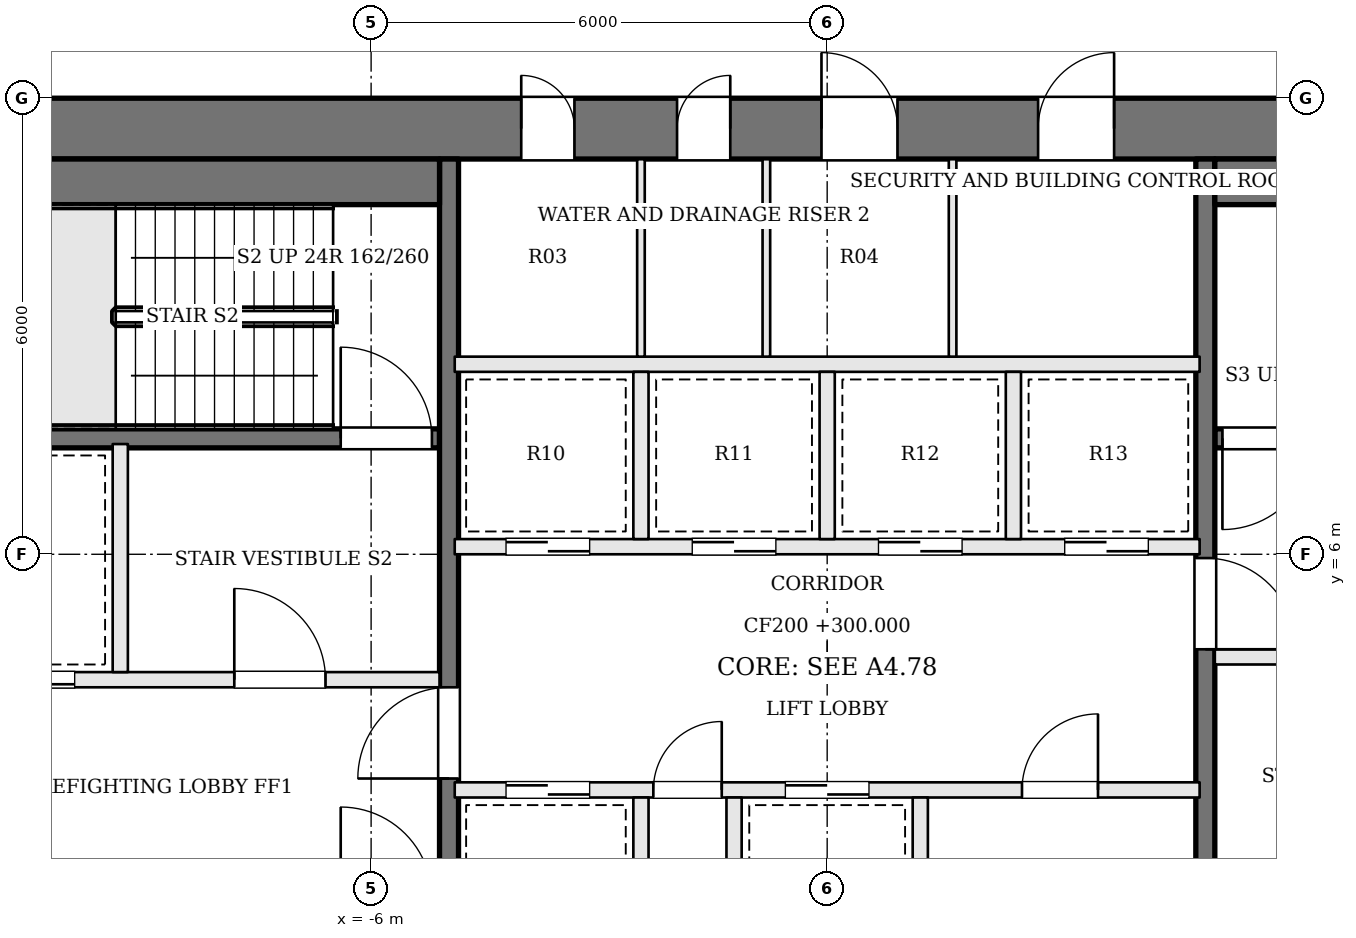
"""IFC4 building model, lengths in metres.
Left out: names, types, materials, properties, quantities, classifications, styles, units other than length and angle.
Written with IfcOpenShell. Run it as: python <this file> out.ifc"""

import sys

from ifc_helpers import new_model, si_unit, direction, frame, frame_2d, origin, place, context, subcontext, project, spatial, rectangle, extrude, element, fill, save


model = new_model("IFC4")
c1 = context("Model", 3, precision=1e-05, world=origin(), true_north=direction((0.0, 1.0)))
c2 = subcontext(c1, "Body", "Model", "MODEL_VIEW")
j1 = project(units=[si_unit("LENGTHUNIT", "METRE"), si_unit("PLANEANGLEUNIT", "RADIAN")], contexts=[c1])
p1 = place(None, origin())
s1 = spatial("IfcSite", under=j1, at=p1, CompositionType="ELEMENT")
p2 = place(p1, origin())
s2 = spatial("IfcBuilding", under=s1, at=p2, CompositionType="ELEMENT")
p3 = place(p2, frame((0.0, 0.0, 300.0)))
s3 = spatial("IfcBuildingStorey", under=s2, at=p3, CompositionType="ELEMENT", Elevation=300.0)
p4 = place(p3, frame((-13.0, 11.6, 0.0), z_axis=(0.0, 0.0, 1.0), x_axis=(1.0, 0.0, 0.0)))
e1 = element("IfcWall", 1, at=p4, inside=s3, PredefinedType="SHEAR", context=c2, shape_type="SweptSolid", body=[
    extrude(rectangle(XDim=26.0, YDim=0.8, at=frame_2d((13.0, 0.0))), origin(), (0.0, 0.0, 1.0), 3.9),
])
p5 = place(p4, frame((8.975, 0.0, 0.0)))
e2 = element("IfcOpeningElement", 2, at=p5, cuts=e1, PredefinedType="OPENING", context=c2, shape_type="SweptSolid", body=[
    extrude(rectangle(XDim=0.7, YDim=2.1, at=frame_2d((0.35, 1.05))), frame((0.0, 0.41, 0.0), z_axis=(0.0, -1.0, 0.0), x_axis=(1.0, 0.0, 0.0)), (0.0, 0.0, 1.0), 0.82),
])
p6 = place(p4, frame((11.025, 0.0, 0.0)))
e3 = element("IfcOpeningElement", 3, at=p6, cuts=e1, PredefinedType="OPENING", context=c2, shape_type="SweptSolid", body=[
    extrude(rectangle(XDim=0.7, YDim=2.1, at=frame_2d((0.35, 1.05))), frame((0.0, 0.41, 0.0), z_axis=(0.0, -1.0, 0.0), x_axis=(1.0, 0.0, 0.0)), (0.0, 0.0, 1.0), 0.82),
])
p7 = place(p4, frame((12.925, 0.0, 0.0)))
e4 = element("IfcOpeningElement", 4, at=p7, cuts=e1, PredefinedType="OPENING", context=c2, shape_type="SweptSolid", body=[
    extrude(rectangle(XDim=1.0, YDim=2.1, at=frame_2d((0.5, 1.05))), frame((0.0, 0.41, 0.0), z_axis=(0.0, -1.0, 0.0), x_axis=(1.0, 0.0, 0.0)), (0.0, 0.0, 1.0), 0.82),
])
p8 = place(p4, frame((15.775, 0.0, 0.0)))
e5 = element("IfcOpeningElement", 5, at=p8, cuts=e1, PredefinedType="OPENING", context=c2, shape_type="SweptSolid", body=[
    extrude(rectangle(XDim=1.0, YDim=2.1, at=frame_2d((0.5, 1.05))), frame((0.0, 0.41, 0.0), z_axis=(0.0, -1.0, 0.0), x_axis=(1.0, 0.0, 0.0)), (0.0, 0.0, 1.0), 0.82),
])
p9 = place(p3, frame((12.2, 7.525, 0.0), z_axis=(0.0, 0.0, 1.0), x_axis=(-1.0, 0.0, 0.0)))
e6 = element("IfcWall", 6, at=p9, inside=s3, PredefinedType="SOLIDWALL", context=c2, shape_type="SweptSolid", body=[
    extrude(rectangle(XDim=7.1, YDim=0.25, at=frame_2d((3.55, 0.0))), origin(), (0.0, 0.0, 1.0), 3.7),
])
p10 = place(p9, frame((5.8, 0.0, 0.0)))
e7 = element("IfcOpeningElement", 7, at=p10, cuts=e6, PredefinedType="OPENING", context=c2, shape_type="SweptSolid", body=[
    extrude(rectangle(XDim=1.2, YDim=2.1, at=frame_2d((0.6, 1.05))), frame((0.0, 0.135, 0.0), z_axis=(0.0, -1.0, 0.0), x_axis=(1.0, 0.0, 0.0)), (0.0, 0.0, 1.0), 0.27),
])
p11 = place(p3, frame((-12.2, 4.35, 0.0), z_axis=(0.0, 0.0, 1.0), x_axis=(1.0, 0.0, 0.0)))
e8 = element("IfcWall", 8, at=p11, inside=s3, PredefinedType="SOLIDWALL", context=c2, shape_type="SweptSolid", body=[
    extrude(rectangle(XDim=7.1, YDim=0.2, at=frame_2d((3.55, 0.0))), origin(), (0.0, 0.0, 1.0), 3.7),
])
p12 = place(p11, frame((4.4, 0.0, 0.0)))
e9 = element("IfcOpeningElement", 9, at=p12, cuts=e8, PredefinedType="OPENING", context=c2, shape_type="SweptSolid", body=[
    extrude(rectangle(XDim=1.2, YDim=2.1, at=frame_2d((0.6, 1.05))), frame((0.0, 0.11, 0.0), z_axis=(0.0, -1.0, 0.0), x_axis=(1.0, 0.0, 0.0)), (0.0, 0.0, 1.0), 0.22),
])
p13 = place(p11, frame((1.1, 0.0, 0.0)))
e10 = element("IfcOpeningElement", 10, at=p13, cuts=e8, PredefinedType="OPENING", context=c2, shape_type="SweptSolid", body=[
    extrude(rectangle(XDim=1.2, YDim=2.1, at=frame_2d((0.6, 1.05))), frame((0.0, 0.11, 0.0), z_axis=(0.0, -1.0, 0.0), x_axis=(1.0, 0.0, 0.0)), (0.0, 0.0, 1.0), 0.22),
])
p14 = place(p3, frame((12.2, 4.65, 0.0), z_axis=(0.0, 0.0, 1.0), x_axis=(-1.0, 0.0, 0.0)))
e11 = element("IfcWall", 11, at=p14, inside=s3, PredefinedType="SOLIDWALL", context=c2, shape_type="SweptSolid", body=[
    extrude(rectangle(XDim=7.1, YDim=0.2, at=frame_2d((3.55, 0.0))), origin(), (0.0, 0.0, 1.0), 3.7),
])
p15 = place(p14, frame((4.4, 0.0, 0.0)))
e12 = element("IfcOpeningElement", 12, at=p15, cuts=e11, PredefinedType="OPENING", context=c2, shape_type="SweptSolid", body=[
    extrude(rectangle(XDim=1.2, YDim=2.1, at=frame_2d((0.6, 1.05))), frame((0.0, 0.11, 0.0), z_axis=(0.0, -1.0, 0.0), x_axis=(1.0, 0.0, 0.0)), (0.0, 0.0, 1.0), 0.22),
])
p16 = place(p14, frame((1.1, 0.0, 0.0)))
e13 = element("IfcOpeningElement", 13, at=p16, cuts=e11, PredefinedType="OPENING", context=c2, shape_type="SweptSolid", body=[
    extrude(rectangle(XDim=1.2, YDim=2.1, at=frame_2d((0.6, 1.05))), frame((0.0, 0.11, 0.0), z_axis=(0.0, -1.0, 0.0), x_axis=(1.0, 0.0, 0.0)), (0.0, 0.0, 1.0), 0.22),
])
p17 = place(p3, frame((-12.2, 7.525, 0.0), z_axis=(0.0, 0.0, 1.0), x_axis=(1.0, 0.0, 0.0)))
e14 = element("IfcWall", 14, at=p17, inside=s3, PredefinedType="SOLIDWALL", context=c2, shape_type="SweptSolid", body=[
    extrude(rectangle(XDim=7.1, YDim=0.25, at=frame_2d((3.55, 0.0))), origin(), (0.0, 0.0, 1.0), 3.7),
])
p18 = place(p17, frame((5.8, 0.0, 0.0)))
e15 = element("IfcOpeningElement", 15, at=p18, cuts=e14, PredefinedType="OPENING", context=c2, shape_type="SweptSolid", body=[
    extrude(rectangle(XDim=1.2, YDim=2.1, at=frame_2d((0.6, 1.05))), frame((0.0, 0.135, 0.0), z_axis=(0.0, -1.0, 0.0), x_axis=(1.0, 0.0, 0.0)), (0.0, 0.0, 1.0), 0.27),
])
p19 = place(p3, frame((-9.3, 4.45, 0.0), z_axis=(0.0, 0.0, 1.0), x_axis=(0.0, 1.0, 0.0)))
e16 = element("IfcWall", 16, at=p19, inside=s3, PredefinedType="SOLIDWALL", context=c2, shape_type="SweptSolid", body=[
    extrude(rectangle(XDim=3.0, YDim=0.2, at=frame_2d((1.5, 0.0))), origin(), (0.0, 0.0, 1.0), 3.7),
])
p20 = place(p3, frame((-4.975, -2.2, 0.0), z_axis=(0.0, 0.0, 1.0), x_axis=(0.0, 1.0, 0.0)))
e17 = element("IfcWall", 17, at=p20, inside=s3, PredefinedType="SOLIDWALL", context=c2, shape_type="SweptSolid", body=[
    extrude(rectangle(XDim=13.4, YDim=0.25, at=frame_2d((6.7, 0.0))), origin(), (0.0, 0.0, 1.0), 3.7),
])
p21 = place(p20, frame((5.25, 0.0, 0.0)))
e18 = element("IfcOpeningElement", 18, at=p21, cuts=e17, PredefinedType="OPENING", context=c2, shape_type="SweptSolid", body=[
    extrude(rectangle(XDim=1.2, YDim=2.1, at=frame_2d((0.6, 1.05))), frame((0.0, 0.135, 0.0), z_axis=(0.0, -1.0, 0.0), x_axis=(1.0, 0.0, 0.0)), (0.0, 0.0, 1.0), 0.27),
])
p22 = place(p3, frame((4.975, 11.2, 0.0), z_axis=(0.0, 0.0, 1.0), x_axis=(0.0, -1.0, 0.0)))
e19 = element("IfcWall", 19, at=p22, inside=s3, PredefinedType="SOLIDWALL", context=c2, shape_type="SweptSolid", body=[
    extrude(rectangle(XDim=13.4, YDim=0.25, at=frame_2d((6.7, 0.0))), origin(), (0.0, 0.0, 1.0), 3.7),
])
p23 = place(p22, frame((5.25, 0.0, 0.0)))
e20 = element("IfcOpeningElement", 20, at=p23, cuts=e19, PredefinedType="OPENING", context=c2, shape_type="SweptSolid", body=[
    extrude(rectangle(XDim=1.2, YDim=2.1, at=frame_2d((0.6, 1.05))), frame((0.0, 0.135, 0.0), z_axis=(0.0, -1.0, 0.0), x_axis=(1.0, 0.0, 0.0)), (0.0, 0.0, 1.0), 0.27),
])
for number, where, z_axis, x_axis in (
    (21, (-12.2, 10.9, 0.0), (0.0, 0.0, 1.0), (1.0, 0.0, 0.0)),
    (22, (12.2, 10.9, 0.0), (0.0, 0.0, 1.0), (-1.0, 0.0, 0.0)),
):
    element("IfcWall", number, at=place(p3, frame(where, z_axis=z_axis, x_axis=x_axis)), inside=s3, PredefinedType="SOLIDWALL", context=c2, shape_type="SweptSolid", body=[
        extrude(rectangle(XDim=7.1, YDim=0.6, at=frame_2d((3.55, 0.0))), origin(), (0.0, 0.0, 1.0), 3.7),
    ])
p24 = place(p3, frame((-4.9, 2.9, 0.0), z_axis=(0.0, 0.0, 1.0), x_axis=(1.0, 0.0, 0.0)))
e23 = element("IfcWall", 23, at=p24, inside=s3, PredefinedType="SOLIDWALL", context=c2, shape_type="SweptSolid", body=[
    extrude(rectangle(XDim=9.8, YDim=0.2, at=frame_2d((4.9, 0.0))), origin(), (0.0, 0.0, 1.0), 3.7),
])
p25 = place(p24, frame((0.675, 0.0, 0.0)))
e24 = element("IfcOpeningElement", 24, at=p25, cuts=e23, PredefinedType="OPENING", context=c2, shape_type="SweptSolid", body=[
    extrude(rectangle(XDim=1.1, YDim=2.1, at=frame_2d((0.55, 1.05))), frame((0.0, 0.11, 0.0), z_axis=(0.0, -1.0, 0.0), x_axis=(1.0, 0.0, 0.0)), (0.0, 0.0, 1.0), 0.22),
])
p26 = place(p24, frame((2.613, 0.0, 0.0)))
e25 = element("IfcOpeningElement", 25, at=p26, cuts=e23, PredefinedType="OPENING", context=c2, shape_type="SweptSolid", body=[
    extrude(rectangle(XDim=0.9, YDim=2.1, at=frame_2d((0.45, 1.05))), frame((0.0, 0.11, 0.0), z_axis=(0.0, -1.0, 0.0), x_axis=(1.0, 0.0, 0.0)), (0.0, 0.0, 1.0), 0.22),
])
p27 = place(p24, frame((4.35, 0.0, 0.0)))
e26 = element("IfcOpeningElement", 26, at=p27, cuts=e23, PredefinedType="OPENING", context=c2, shape_type="SweptSolid", body=[
    extrude(rectangle(XDim=1.1, YDim=2.1, at=frame_2d((0.55, 1.05))), frame((0.0, 0.11, 0.0), z_axis=(0.0, -1.0, 0.0), x_axis=(1.0, 0.0, 0.0)), (0.0, 0.0, 1.0), 0.22),
])
p28 = place(p24, frame((7.463, 0.0, 0.0)))
e27 = element("IfcOpeningElement", 27, at=p28, cuts=e23, PredefinedType="OPENING", context=c2, shape_type="SweptSolid", body=[
    extrude(rectangle(XDim=1.0, YDim=2.1, at=frame_2d((0.5, 1.05))), frame((0.0, 0.11, 0.0), z_axis=(0.0, -1.0, 0.0), x_axis=(1.0, 0.0, 0.0)), (0.0, 0.0, 1.0), 0.22),
])
p29 = place(p3, frame((-4.9, 6.1, 0.0), z_axis=(0.0, 0.0, 1.0), x_axis=(1.0, 0.0, 0.0)))
e28 = element("IfcWall", 28, at=p29, inside=s3, PredefinedType="SOLIDWALL", context=c2, shape_type="SweptSolid", body=[
    extrude(rectangle(XDim=9.8, YDim=0.2, at=frame_2d((4.9, 0.0))), origin(), (0.0, 0.0, 1.0), 3.7),
])
p30 = place(p29, frame((0.675, 0.0, 0.0)))
e29 = element("IfcOpeningElement", 29, at=p30, cuts=e28, PredefinedType="OPENING", context=c2, shape_type="SweptSolid", body=[
    extrude(rectangle(XDim=1.1, YDim=2.1, at=frame_2d((0.55, 1.05))), frame((0.0, 0.11, 0.0), z_axis=(0.0, -1.0, 0.0), x_axis=(1.0, 0.0, 0.0)), (0.0, 0.0, 1.0), 0.22),
])
p31 = place(p29, frame((3.125, 0.0, 0.0)))
e30 = element("IfcOpeningElement", 30, at=p31, cuts=e28, PredefinedType="OPENING", context=c2, shape_type="SweptSolid", body=[
    extrude(rectangle(XDim=1.1, YDim=2.1, at=frame_2d((0.55, 1.05))), frame((0.0, 0.11, 0.0), z_axis=(0.0, -1.0, 0.0), x_axis=(1.0, 0.0, 0.0)), (0.0, 0.0, 1.0), 0.22),
])
p32 = place(p29, frame((5.575, 0.0, 0.0)))
e31 = element("IfcOpeningElement", 31, at=p32, cuts=e28, PredefinedType="OPENING", context=c2, shape_type="SweptSolid", body=[
    extrude(rectangle(XDim=1.1, YDim=2.1, at=frame_2d((0.55, 1.05))), frame((0.0, 0.11, 0.0), z_axis=(0.0, -1.0, 0.0), x_axis=(1.0, 0.0, 0.0)), (0.0, 0.0, 1.0), 0.22),
])
p33 = place(p29, frame((8.025, 0.0, 0.0)))
e32 = element("IfcOpeningElement", 32, at=p33, cuts=e28, PredefinedType="OPENING", context=c2, shape_type="SweptSolid", body=[
    extrude(rectangle(XDim=1.1, YDim=2.1, at=frame_2d((0.55, 1.05))), frame((0.0, 0.11, 0.0), z_axis=(0.0, -1.0, 0.0), x_axis=(1.0, 0.0, 0.0)), (0.0, 0.0, 1.0), 0.22),
])
p34 = place(p3, frame((-4.9, 8.5, 0.0), z_axis=(0.0, 0.0, 1.0), x_axis=(1.0, 0.0, 0.0)))
e33 = element("IfcWall", 33, at=p34, inside=s3, PredefinedType="SOLIDWALL", context=c2, shape_type="SweptSolid", body=[
    extrude(rectangle(XDim=9.8, YDim=0.2, at=frame_2d((4.9, 0.0))), origin(), (0.0, 0.0, 1.0), 3.7),
])
for number, where, z_axis, x_axis in (
    (34, (-2.45, 0.6, 0.0), (0.0, 0.0, 1.0), (0.0, 1.0, 0.0)),
    (35, (-1.225, 0.6, 0.0), (0.0, 0.0, 1.0), (0.0, 1.0, 0.0)),
    (36, (1.225, 0.6, 0.0), (0.0, 0.0, 1.0), (0.0, 1.0, 0.0)),
    (37, (-2.45, 6.2, 0.0), (0.0, 0.0, 1.0), (0.0, 1.0, 0.0)),
    (38, (0.0, 6.2, 0.0), (0.0, 0.0, 1.0), (0.0, 1.0, 0.0)),
    (39, (2.45, 6.2, 0.0), (0.0, 0.0, 1.0), (0.0, 1.0, 0.0)),
):
    element("IfcWall", number, at=place(p3, frame(where, z_axis=z_axis, x_axis=x_axis)), inside=s3, PredefinedType="SOLIDWALL", context=c2, shape_type="SweptSolid", body=[
        extrude(rectangle(XDim=2.2, YDim=0.2, at=frame_2d((1.1, 0.0))), origin(), (0.0, 0.0, 1.0), 3.7),
    ])
for number, where, z_axis, x_axis in (
    (40, (-2.45, 8.6, 0.0), (0.0, 0.0, 1.0), (0.0, 1.0, 0.0)),
    (41, (-0.8, 8.6, 0.0), (0.0, 0.0, 1.0), (0.0, 1.0, 0.0)),
    (42, (1.65, 8.6, 0.0), (0.0, 0.0, 1.0), (0.0, 1.0, 0.0)),
):
    element("IfcWall", number, at=place(p3, frame(where, z_axis=z_axis, x_axis=x_axis)), inside=s3, PredefinedType="PARTITIONING", context=c2, shape_type="SweptSolid", body=[
        extrude(rectangle(XDim=2.6, YDim=0.1, at=frame_2d((1.3, 0.0))), origin(), (0.0, 0.0, 1.0), 3.7),
    ])
p35 = place(p21, origin())
e43 = element("IfcDoor", 43, at=p35, inside=s3, OperationType="SINGLE_SWING_LEFT", PredefinedType="DOOR", context=c2, shape_type="SweptSolid", body=[
    extrude(rectangle(XDim=1.2, YDim=2.1, at=frame_2d((0.6, 1.05))), frame((0.0, 0.025, 0.0), z_axis=(0.0, -1.0, 0.0), x_axis=(1.0, 0.0, 0.0)), (0.0, 0.0, 1.0), 0.05),
])
fill(e18, e43)
p36 = place(p23, origin())
e44 = element("IfcDoor", 44, at=p36, inside=s3, OperationType="SINGLE_SWING_RIGHT", PredefinedType="DOOR", context=c2, shape_type="SweptSolid", body=[
    extrude(rectangle(XDim=1.2, YDim=2.1, at=frame_2d((0.6, 1.05))), frame((0.0, 0.025, 0.0), z_axis=(0.0, -1.0, 0.0), x_axis=(1.0, 0.0, 0.0)), (0.0, 0.0, 1.0), 0.05),
])
fill(e20, e44)
p37 = place(p12, origin())
e45 = element("IfcDoor", 45, at=p37, inside=s3, OperationType="SINGLE_SWING_LEFT", PredefinedType="DOOR", context=c2, shape_type="SweptSolid", body=[
    extrude(rectangle(XDim=1.2, YDim=2.1, at=frame_2d((0.6, 1.05))), frame((0.0, 0.025, 0.0), z_axis=(0.0, -1.0, 0.0), x_axis=(1.0, 0.0, 0.0)), (0.0, 0.0, 1.0), 0.05),
])
fill(e9, e45)
p38 = place(p10, origin())
e46 = element("IfcDoor", 46, at=p38, inside=s3, OperationType="SINGLE_SWING_RIGHT", PredefinedType="DOOR", context=c2, shape_type="SweptSolid", body=[
    extrude(rectangle(XDim=1.2, YDim=2.1, at=frame_2d((0.6, 1.05))), frame((0.0, 0.025, 0.0), z_axis=(0.0, -1.0, 0.0), x_axis=(1.0, 0.0, 0.0)), (0.0, 0.0, 1.0), 0.05),
])
fill(e7, e46)
p39 = place(p18, origin())
e47 = element("IfcDoor", 47, at=p39, inside=s3, OperationType="SINGLE_SWING_LEFT", PredefinedType="DOOR", context=c2, shape_type="SweptSolid", body=[
    extrude(rectangle(XDim=1.2, YDim=2.1, at=frame_2d((0.6, 1.05))), frame((0.0, 0.025, 0.0), z_axis=(0.0, -1.0, 0.0), x_axis=(1.0, 0.0, 0.0)), (0.0, 0.0, 1.0), 0.05),
])
fill(e15, e47)
p40 = place(p13, origin())
e48 = element("IfcDoor", 48, at=p40, inside=s3, OperationType="SLIDING_TO_RIGHT", PredefinedType="DOOR", context=c2, shape_type="SweptSolid", body=[
    extrude(rectangle(XDim=1.2, YDim=2.1, at=frame_2d((0.6, 1.05))), frame((0.0, 0.025, 0.0), z_axis=(0.0, -1.0, 0.0), x_axis=(1.0, 0.0, 0.0)), (0.0, 0.0, 1.0), 0.05),
])
fill(e10, e48)
p41 = place(p25, origin())
e49 = element("IfcDoor", 49, at=p41, inside=s3, OperationType="SLIDING_TO_RIGHT", PredefinedType="DOOR", context=c2, shape_type="SweptSolid", body=[
    extrude(rectangle(XDim=1.1, YDim=2.1, at=frame_2d((0.55, 1.05))), frame((0.0, 0.025, 0.0), z_axis=(0.0, -1.0, 0.0), x_axis=(1.0, 0.0, 0.0)), (0.0, 0.0, 1.0), 0.05),
])
fill(e24, e49)
p42 = place(p26, origin())
e50 = element("IfcDoor", 50, at=p42, inside=s3, OperationType="SINGLE_SWING_RIGHT", PredefinedType="DOOR", context=c2, shape_type="SweptSolid", body=[
    extrude(rectangle(XDim=0.9, YDim=2.1, at=frame_2d((0.45, 1.05))), frame((0.0, 0.025, 0.0), z_axis=(0.0, -1.0, 0.0), x_axis=(1.0, 0.0, 0.0)), (0.0, 0.0, 1.0), 0.05),
])
fill(e25, e50)
p43 = place(p27, origin())
e51 = element("IfcDoor", 51, at=p43, inside=s3, OperationType="SLIDING_TO_LEFT", PredefinedType="DOOR", context=c2, shape_type="SweptSolid", body=[
    extrude(rectangle(XDim=1.1, YDim=2.1, at=frame_2d((0.55, 1.05))), frame((0.0, 0.025, 0.0), z_axis=(0.0, -1.0, 0.0), x_axis=(1.0, 0.0, 0.0)), (0.0, 0.0, 1.0), 0.05),
])
fill(e26, e51)
p44 = place(p28, origin())
e52 = element("IfcDoor", 52, at=p44, inside=s3, OperationType="SINGLE_SWING_RIGHT", PredefinedType="DOOR", context=c2, shape_type="SweptSolid", body=[
    extrude(rectangle(XDim=1.0, YDim=2.1, at=frame_2d((0.5, 1.05))), frame((0.0, 0.025, 0.0), z_axis=(0.0, -1.0, 0.0), x_axis=(1.0, 0.0, 0.0)), (0.0, 0.0, 1.0), 0.05),
])
fill(e27, e52)
p45 = place(p30, origin())
e53 = element("IfcDoor", 53, at=p45, inside=s3, OperationType="SLIDING_TO_RIGHT", PredefinedType="DOOR", context=c2, shape_type="SweptSolid", body=[
    extrude(rectangle(XDim=1.1, YDim=2.1, at=frame_2d((0.55, 1.05))), frame((0.0, 0.025, 0.0), z_axis=(0.0, -1.0, 0.0), x_axis=(1.0, 0.0, 0.0)), (0.0, 0.0, 1.0), 0.05),
])
fill(e29, e53)
p46 = place(p31, origin())
e54 = element("IfcDoor", 54, at=p46, inside=s3, OperationType="SLIDING_TO_LEFT", PredefinedType="DOOR", context=c2, shape_type="SweptSolid", body=[
    extrude(rectangle(XDim=1.1, YDim=2.1, at=frame_2d((0.55, 1.05))), frame((0.0, 0.025, 0.0), z_axis=(0.0, -1.0, 0.0), x_axis=(1.0, 0.0, 0.0)), (0.0, 0.0, 1.0), 0.05),
])
fill(e30, e54)
p47 = place(p32, origin())
e55 = element("IfcDoor", 55, at=p47, inside=s3, OperationType="SLIDING_TO_RIGHT", PredefinedType="DOOR", context=c2, shape_type="SweptSolid", body=[
    extrude(rectangle(XDim=1.1, YDim=2.1, at=frame_2d((0.55, 1.05))), frame((0.0, 0.025, 0.0), z_axis=(0.0, -1.0, 0.0), x_axis=(1.0, 0.0, 0.0)), (0.0, 0.0, 1.0), 0.05),
])
fill(e31, e55)
p48 = place(p33, origin())
e56 = element("IfcDoor", 56, at=p48, inside=s3, OperationType="SLIDING_TO_LEFT", PredefinedType="DOOR", context=c2, shape_type="SweptSolid", body=[
    extrude(rectangle(XDim=1.1, YDim=2.1, at=frame_2d((0.55, 1.05))), frame((0.0, 0.025, 0.0), z_axis=(0.0, -1.0, 0.0), x_axis=(1.0, 0.0, 0.0)), (0.0, 0.0, 1.0), 0.05),
])
fill(e32, e56)
p49 = place(p5, origin())
e57 = element("IfcDoor", 57, at=p49, inside=s3, OperationType="SINGLE_SWING_LEFT", PredefinedType="DOOR", context=c2, shape_type="SweptSolid", body=[
    extrude(rectangle(XDim=0.7, YDim=2.1, at=frame_2d((0.35, 1.05))), frame((0.0, 0.025, 0.0), z_axis=(0.0, -1.0, 0.0), x_axis=(1.0, 0.0, 0.0)), (0.0, 0.0, 1.0), 0.05),
])
fill(e2, e57)
p50 = place(p6, origin())
e58 = element("IfcDoor", 58, at=p50, inside=s3, OperationType="SINGLE_SWING_RIGHT", PredefinedType="DOOR", context=c2, shape_type="SweptSolid", body=[
    extrude(rectangle(XDim=0.7, YDim=2.1, at=frame_2d((0.35, 1.05))), frame((0.0, 0.025, 0.0), z_axis=(0.0, -1.0, 0.0), x_axis=(1.0, 0.0, 0.0)), (0.0, 0.0, 1.0), 0.05),
])
fill(e3, e58)
p51 = place(p7, origin())
e59 = element("IfcDoor", 59, at=p51, inside=s3, OperationType="SINGLE_SWING_LEFT", PredefinedType="DOOR", context=c2, shape_type="SweptSolid", body=[
    extrude(rectangle(XDim=1.0, YDim=2.1, at=frame_2d((0.5, 1.05))), frame((0.0, 0.025, 0.0), z_axis=(0.0, -1.0, 0.0), x_axis=(1.0, 0.0, 0.0)), (0.0, 0.0, 1.0), 0.05),
])
fill(e4, e59)
p52 = place(p8, origin())
e60 = element("IfcDoor", 60, at=p52, inside=s3, OperationType="SINGLE_SWING_RIGHT", PredefinedType="DOOR", context=c2, shape_type="SweptSolid", body=[
    extrude(rectangle(XDim=1.0, YDim=2.1, at=frame_2d((0.5, 1.05))), frame((0.0, 0.025, 0.0), z_axis=(0.0, -1.0, 0.0), x_axis=(1.0, 0.0, 0.0)), (0.0, 0.0, 1.0), 0.05),
])
fill(e5, e60)
save(model, sys.argv[1])
